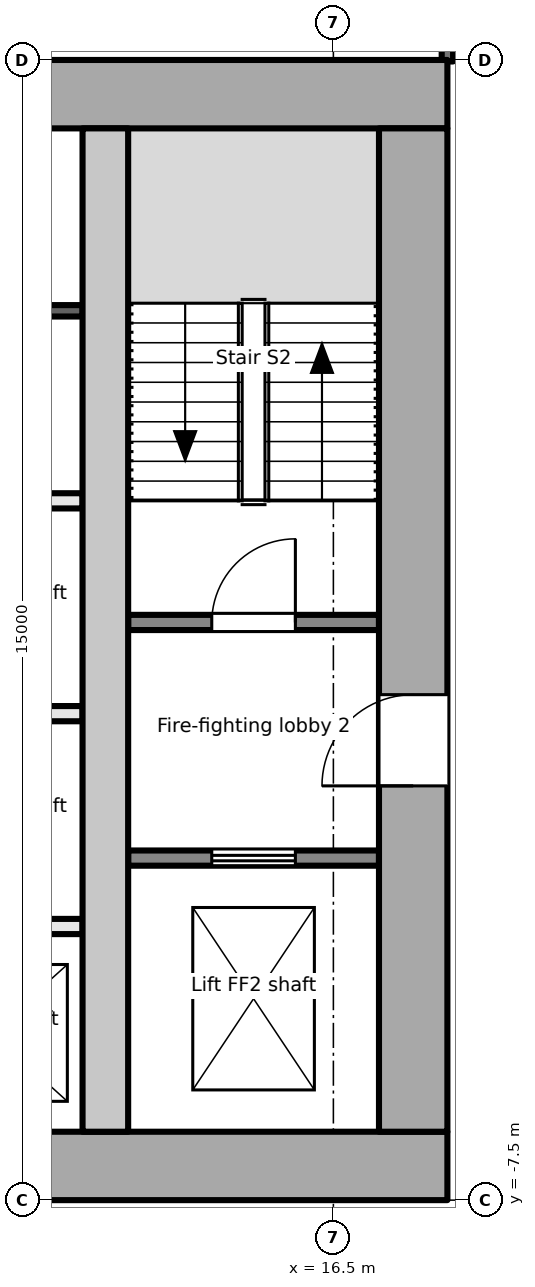
"""IFC4 building model, lengths in metres.
Left out: names, types, materials, properties, quantities, classifications, styles, units other than length and angle.
Written with IfcOpenShell. Run it as: python <this file> out.ifc"""

import sys

from ifc_helpers import new_model, si_unit, direction, frame, frame_2d, origin, place, context, subcontext, project, spatial, rectangle, extrude, element, fill, save


model = new_model("IFC4")
c1 = context("Model", 3, precision=1e-05, world=origin(), true_north=direction((0.0, 1.0)))
c2 = subcontext(c1, "Body", "Model", "MODEL_VIEW")
j1 = project(units=[si_unit("LENGTHUNIT", "METRE"), si_unit("PLANEANGLEUNIT", "RADIAN")], contexts=[c1])
p1 = place(None, origin())
s1 = spatial("IfcSite", under=j1, at=p1, CompositionType="ELEMENT")
p2 = place(p1, origin())
s2 = spatial("IfcBuilding", under=s1, at=p2, CompositionType="ELEMENT")
p3 = place(p2, frame((0.0, 0.0, 111.7)))
s3 = spatial("IfcBuildingStorey", under=s2, at=p3, CompositionType="ELEMENT", Elevation=111.7)
p4 = place(p3, frame((-18.0, -7.05, -0.2), z_axis=(0.0, 0.0, 1.0), x_axis=(1.0, 0.0, 0.0)))
e1 = element("IfcWall", 1, at=p4, inside=s3, PredefinedType="SHEAR", context=c2, shape_type="SweptSolid", body=[
    extrude(rectangle(XDim=36.0, YDim=0.9, at=frame_2d((18.0, 0.0))), origin(), (0.0, 0.0, 1.0), 4.0),
])
p5 = place(p4, frame((7.8, 0.0, 0.2)))
e2 = element("IfcOpeningElement", 2, at=p5, cuts=e1, PredefinedType="OPENING", context=c2, shape_type="SweptSolid", body=[
    extrude(rectangle(XDim=2.4, YDim=2.1, at=frame_2d((1.2, 1.05))), frame((0.0, 0.46, 0.0), z_axis=(0.0, -1.0, 0.0), x_axis=(1.0, 0.0, 0.0)), (0.0, 0.0, 1.0), 0.921),
])
p6 = place(p4, frame((17.4, 0.0, 0.2)))
e3 = element("IfcOpeningElement", 3, at=p6, cuts=e1, PredefinedType="OPENING", context=c2, shape_type="SweptSolid", body=[
    extrude(rectangle(XDim=1.2, YDim=2.1, at=frame_2d((0.6, 1.05))), frame((0.0, 0.46, 0.0), z_axis=(0.0, -1.0, 0.0), x_axis=(1.0, 0.0, 0.0)), (0.0, 0.0, 1.0), 0.921),
])
p7 = place(p4, frame((26.1, 0.0, 0.2)))
e4 = element("IfcOpeningElement", 4, at=p7, cuts=e1, PredefinedType="OPENING", context=c2, shape_type="SweptSolid", body=[
    extrude(rectangle(XDim=2.4, YDim=2.1, at=frame_2d((1.2, 1.05))), frame((0.0, 0.46, 0.0), z_axis=(0.0, -1.0, 0.0), x_axis=(1.0, 0.0, 0.0)), (0.0, 0.0, 1.0), 0.921),
])
p8 = place(p3, frame((-18.0, 7.05, -0.2), z_axis=(0.0, 0.0, 1.0), x_axis=(1.0, 0.0, 0.0)))
e5 = element("IfcWall", 5, at=p8, inside=s3, PredefinedType="SHEAR", context=c2, shape_type="SweptSolid", body=[
    extrude(rectangle(XDim=36.0, YDim=0.9, at=frame_2d((18.0, 0.0))), origin(), (0.0, 0.0, 1.0), 4.0),
])
p9 = place(p3, frame((17.55, -6.6, -0.2), z_axis=(0.0, 0.0, 1.0), x_axis=(0.0, 1.0, 0.0)))
e6 = element("IfcWall", 6, at=p9, inside=s3, PredefinedType="SHEAR", context=c2, shape_type="SweptSolid", body=[
    extrude(rectangle(XDim=13.2, YDim=0.9, at=frame_2d((6.6, 0.0))), origin(), (0.0, 0.0, 1.0), 4.0),
])
p10 = place(p9, frame((4.55, 0.0, 0.2)))
e7 = element("IfcOpeningElement", 7, at=p10, cuts=e6, PredefinedType="OPENING", context=c2, shape_type="SweptSolid", body=[
    extrude(rectangle(XDim=1.2, YDim=2.1, at=frame_2d((0.6, 1.05))), frame((0.0, 0.46, 0.0), z_axis=(0.0, -1.0, 0.0), x_axis=(1.0, 0.0, 0.0)), (0.0, 0.0, 1.0), 0.921),
])
p11 = place(p3, frame((13.5, -6.6, -0.2), z_axis=(0.0, 0.0, 1.0), x_axis=(0.0, 1.0, 0.0)))
e8 = element("IfcWall", 8, at=p11, inside=s3, PredefinedType="SHEAR", context=c2, shape_type="SweptSolid", body=[
    extrude(rectangle(XDim=13.2, YDim=0.6, at=frame_2d((6.6, 0.0))), origin(), (0.0, 0.0, 1.0), 4.0),
])
p12 = place(p3, frame((13.8, -3.0, 0.0), z_axis=(0.0, 0.0, 1.0), x_axis=(1.0, 0.0, 0.0)))
e9 = element("IfcWall", 9, at=p12, inside=s3, PredefinedType="PARTITIONING", context=c2, shape_type="SweptSolid", body=[
    extrude(rectangle(XDim=3.3, YDim=0.2, at=frame_2d((1.65, 0.0))), origin(), (0.0, 0.0, 1.0), 3.8),
])
p13 = place(p12, frame((1.1, 0.0, 0.0)))
e10 = element("IfcOpeningElement", 10, at=p13, cuts=e9, PredefinedType="OPENING", context=c2, shape_type="SweptSolid", body=[
    extrude(rectangle(XDim=1.1, YDim=2.1, at=frame_2d((0.55, 1.05))), frame((0.0, 0.111, 0.0), z_axis=(0.0, -1.0, 0.0), x_axis=(1.0, 0.0, 0.0)), (0.0, 0.0, 1.0), 0.221),
])
p14 = place(p3, frame((13.8, 0.1, 0.0), z_axis=(0.0, 0.0, 1.0), x_axis=(1.0, 0.0, 0.0)))
e11 = element("IfcWall", 11, at=p14, inside=s3, PredefinedType="PARTITIONING", context=c2, shape_type="SweptSolid", body=[
    extrude(rectangle(XDim=3.3, YDim=0.2, at=frame_2d((1.65, 0.0))), origin(), (0.0, 0.0, 1.0), 3.8),
])
p15 = place(p14, frame((1.1, 0.0, 0.0)))
e12 = element("IfcOpeningElement", 12, at=p15, cuts=e11, PredefinedType="OPENING", context=c2, shape_type="SweptSolid", body=[
    extrude(rectangle(XDim=1.1, YDim=2.1, at=frame_2d((0.55, 1.05))), frame((0.0, 0.111, 0.0), z_axis=(0.0, -1.0, 0.0), x_axis=(1.0, 0.0, 0.0)), (0.0, 0.0, 1.0), 0.221),
])
for number, where, z_axis, x_axis in (
    (13, (10.9, -3.9, 0.0), (0.0, 0.0, 1.0), (1.0, 0.0, 0.0)),
    (14, (10.9, -1.1, 0.0), (0.0, 0.0, 1.0), (1.0, 0.0, 0.0)),
    (15, (10.9, 1.7, 0.0), (0.0, 0.0, 1.0), (1.0, 0.0, 0.0)),
):
    element("IfcWall", number, at=place(p3, frame(where, z_axis=z_axis, x_axis=x_axis)), inside=s3, PredefinedType="PARTITIONING", context=c2, shape_type="SweptSolid", body=[
        extrude(rectangle(XDim=2.3, YDim=0.2, at=frame_2d((1.15, 0.0))), origin(), (0.0, 0.0, 1.0), 3.8),
    ])
p16 = place(p3, frame((10.9, 4.2, 0.0), z_axis=(0.0, 0.0, 1.0), x_axis=(1.0, 0.0, 0.0)))
e16 = element("IfcWall", 16, at=p16, inside=s3, PredefinedType="PARTITIONING", context=c2, shape_type="SweptSolid", body=[
    extrude(rectangle(XDim=2.3, YDim=0.15, at=frame_2d((1.15, 0.0))), origin(), (0.0, 0.0, 1.0), 3.8),
])
p17 = place(p3, frame((18.0, 7.48, 0.0), z_axis=(0.0, 0.0, 1.0), x_axis=(0.0, 1.0, 0.0)))
e17 = element("IfcWall", 17, at=p17, inside=s3, PredefinedType="PARTITIONING", context=c2, shape_type="SweptSolid", body=[
    extrude(rectangle(XDim=3.26, YDim=0.15, at=frame_2d((1.63, 0.0))), origin(), (0.0, 0.0, 1.0), 2.8),
])
p18 = place(p17, frame((1.645, 0.0, 0.0)))
e18 = element("IfcOpeningElement", 18, at=p18, cuts=e17, PredefinedType="OPENING", context=c2, shape_type="SweptSolid", body=[
    extrude(rectangle(XDim=0.9, YDim=2.1, at=frame_2d((0.45, 1.05))), frame((0.0, 0.085, 0.0), z_axis=(0.0, -1.0, 0.0), x_axis=(1.0, 0.0, 0.0)), (0.0, 0.0, 1.0), 0.171),
])
p19 = place(p13, origin())
e19 = element("IfcDoor", 19, at=p19, inside=s3, OperationType="DOUBLE_DOOR_SLIDING", PredefinedType="DOOR", context=c2, shape_type="SweptSolid", body=[
    extrude(rectangle(XDim=1.1, YDim=2.1, at=frame_2d((0.55, 1.05))), frame((0.0, 0.025, 0.0), z_axis=(0.0, -1.0, 0.0), x_axis=(1.0, 0.0, 0.0)), (0.0, 0.0, 1.0), 0.05),
])
fill(e10, e19)
p20 = place(p10, origin())
e20 = element("IfcDoor", 20, at=p20, inside=s3, OperationType="SINGLE_SWING_LEFT", PredefinedType="DOOR", context=c2, shape_type="SweptSolid", body=[
    extrude(rectangle(XDim=1.2, YDim=2.1, at=frame_2d((0.6, 1.05))), frame((0.0, 0.025, 0.0), z_axis=(0.0, -1.0, 0.0), x_axis=(1.0, 0.0, 0.0)), (0.0, 0.0, 1.0), 0.05),
])
fill(e7, e20)
p21 = place(p15, origin())
e21 = element("IfcDoor", 21, at=p21, inside=s3, OperationType="SINGLE_SWING_RIGHT", PredefinedType="DOOR", context=c2, shape_type="SweptSolid", body=[
    extrude(rectangle(XDim=1.1, YDim=2.1, at=frame_2d((0.55, 1.05))), frame((0.0, 0.025, 0.0), z_axis=(0.0, -1.0, 0.0), x_axis=(1.0, 0.0, 0.0)), (0.0, 0.0, 1.0), 0.05),
])
fill(e12, e21)
save(model, sys.argv[1])
